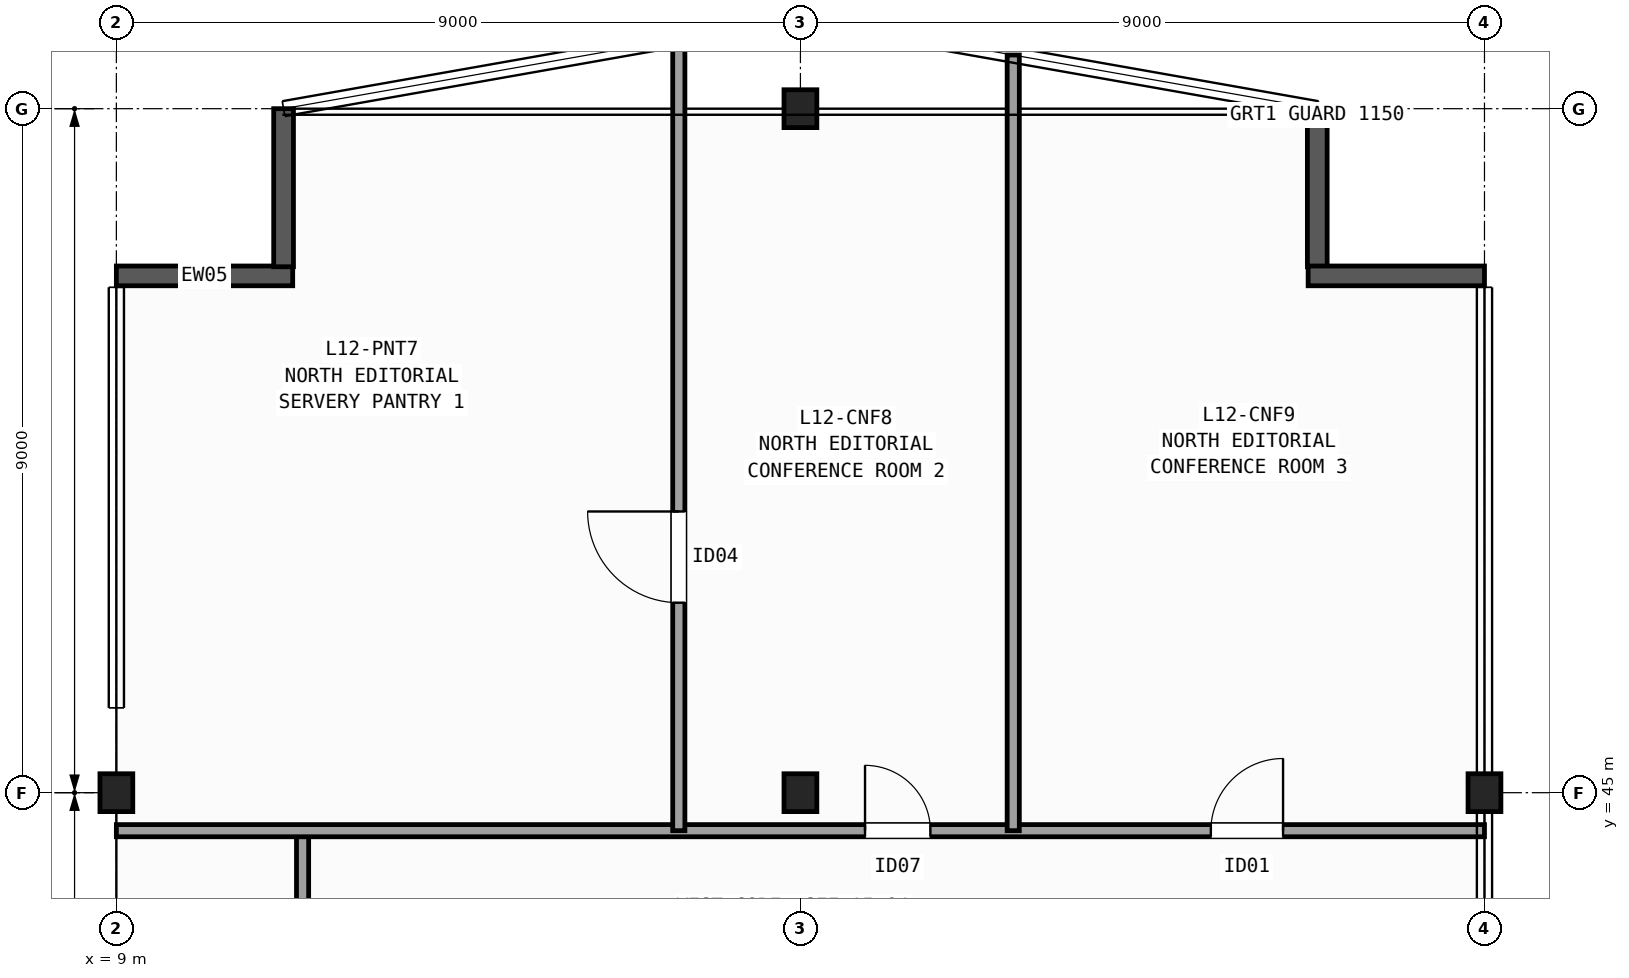
"""IFC4 building model, lengths in metres.
Left out: names, types, materials, properties, quantities, classifications, styles, units other than length and angle.
Written with IfcOpenShell. Run it as: python <this file> out.ifc"""

import sys

from ifc_helpers import new_model, si_unit, direction, frame, frame_2d, origin, origin_2d, place, context, subcontext, project, spatial, rectangle, i_section, extrude, element, fill, save


model = new_model("IFC4")
c1 = context("Model", 3, precision=1e-05, world=origin(), true_north=direction((0.0, 1.0)))
c2 = subcontext(c1, "Body", "Model", "MODEL_VIEW")
j1 = project(units=[si_unit("LENGTHUNIT", "METRE"), si_unit("PLANEANGLEUNIT", "RADIAN")], contexts=[c1])
p1 = place(None, origin())
s1 = spatial("IfcSite", under=j1, at=p1, CompositionType="ELEMENT")
p2 = place(p1, origin())
s2 = spatial("IfcBuilding", under=s1, at=p2, CompositionType="ELEMENT")
p3 = place(p2, frame((0.0, 0.0, 54.5)))
s3 = spatial("IfcBuildingStorey", under=s2, at=p3, CompositionType="ELEMENT", Elevation=54.5)
for number, where, z_axis, x_axis in (
    (1, (9.0, 45.0, 0.0), (0.0, 0.0, 1.0), (1.0, 0.0, 0.0)),
    (2, (18.0, 45.0, 0.0), (0.0, 0.0, 1.0), (1.0, 0.0, 0.0)),
    (3, (18.0, 54.0, 0.0), (0.0, 0.0, 1.0), (1.0, 0.0, 0.0)),
    (4, (27.0, 45.0, 0.0), (0.0, 0.0, 1.0), (1.0, 0.0, 0.0)),
):
    element("IfcColumn", number, at=place(p3, frame(where, z_axis=z_axis, x_axis=x_axis)), inside=s3, PredefinedType="COLUMN", context=c2, shape_type="SweptSolid", body=[
        extrude(i_section(OverallWidth=0.432, OverallDepth=0.498, WebThickness=0.056, FlangeThickness=0.089, FilletRadius=0.015, at=origin_2d()), origin(), (0.0, 0.0, 1.0), 3.7),
    ])
p4 = place(p3, frame((9.0, 51.8, 0.0), z_axis=(0.0, 0.0, 1.0), x_axis=(1.0, 0.0, 0.0)))
e5 = element("IfcWall", 5, at=p4, inside=s3, PredefinedType="SOLIDWALL", context=c2, shape_type="SweptSolid", body=[
    extrude(rectangle(XDim=2.32, YDim=0.26, at=frame_2d((1.16, 0.0))), origin(), (0.0, 0.0, 1.0), 3.42),
])
for number, where, z_axis, x_axis in (
    (6, (11.2, 51.92, 0.0), (0.0, 0.0, 1.0), (0.0, 1.0, 0.0)),
    (7, (24.8, 54.0, 0.0), (0.0, 0.0, 1.0), (0.0, -1.0, 0.0)),
):
    element("IfcWall", number, at=place(p3, frame(where, z_axis=z_axis, x_axis=x_axis)), inside=s3, PredefinedType="SOLIDWALL", context=c2, shape_type="SweptSolid", body=[
        extrude(rectangle(XDim=2.08, YDim=0.26, at=frame_2d((1.04, 0.0))), origin(), (0.0, 0.0, 1.0), 3.42),
    ])
p5 = place(p3, frame((24.68, 51.8, 0.0), z_axis=(0.0, 0.0, 1.0), x_axis=(1.0, 0.0, 0.0)))
e8 = element("IfcWall", 8, at=p5, inside=s3, PredefinedType="SOLIDWALL", context=c2, shape_type="SweptSolid", body=[
    extrude(rectangle(XDim=2.32, YDim=0.26, at=frame_2d((1.16, 0.0))), origin(), (0.0, 0.0, 1.0), 3.42),
])
p6 = place(p3, frame((11.45, 42.4, 0.0), z_axis=(0.0, 0.0, 1.0), x_axis=(0.0, 1.0, 0.0)))
e9 = element("IfcWall", 9, at=p6, inside=s3, PredefinedType="PARTITIONING", context=c2, shape_type="SweptSolid", body=[
    extrude(rectangle(XDim=2.1, YDim=0.16, at=frame_2d((1.05, 0.0))), origin(), (0.0, 0.0, 1.0), 3.42),
])
p7 = place(p3, frame((9.0, 44.5, 0.0), z_axis=(0.0, 0.0, 1.0), x_axis=(1.0, 0.0, 0.0)))
e10 = element("IfcWall", 10, at=p7, inside=s3, PredefinedType="PARTITIONING", context=c2, shape_type="SweptSolid", body=[
    extrude(rectangle(XDim=18.0, YDim=0.16, at=frame_2d((9.0, 0.0))), origin(), (0.0, 0.0, 1.0), 2.627),
])
p8 = place(p7, frame((9.85, 0.0, 0.0)))
e11 = element("IfcOpeningElement", 11, at=p8, cuts=e10, PredefinedType="OPENING", context=c2, shape_type="SweptSolid", body=[
    extrude(rectangle(XDim=0.86, YDim=2.05, at=frame_2d((0.43, 1.025))), frame((0.0, 0.09, 0.0), z_axis=(0.0, -1.0, 0.0), x_axis=(1.0, 0.0, 0.0)), (0.0, 0.0, 1.0), 0.18),
])
p9 = place(p7, frame((14.4, 0.0, 0.0)))
e12 = element("IfcOpeningElement", 12, at=p9, cuts=e10, PredefinedType="OPENING", context=c2, shape_type="SweptSolid", body=[
    extrude(rectangle(XDim=0.95, YDim=2.1, at=frame_2d((0.475, 1.05))), frame((0.0, 0.09, 0.0), z_axis=(0.0, -1.0, 0.0), x_axis=(1.0, 0.0, 0.0)), (0.0, 0.0, 1.0), 0.18),
])
p10 = place(p3, frame((16.4, 44.5, 0.0), z_axis=(0.0, 0.0, 1.0), x_axis=(0.0, 1.0, 0.0)))
e13 = element("IfcWall", 13, at=p10, inside=s3, PredefinedType="PARTITIONING", context=c2, shape_type="SweptSolid", body=[
    extrude(rectangle(XDim=10.418, YDim=0.16, at=frame_2d((5.209, 0.0))), origin(), (0.0, 0.0, 1.0), 3.42),
])
p11 = place(p10, frame((3.0, 0.0, 0.0)))
e14 = element("IfcOpeningElement", 14, at=p11, cuts=e13, PredefinedType="OPENING", context=c2, shape_type="SweptSolid", body=[
    extrude(rectangle(XDim=1.2, YDim=2.15, at=frame_2d((0.6, 1.075))), frame((0.0, 0.09, 0.0), z_axis=(0.0, -1.0, 0.0), x_axis=(1.0, 0.0, 0.0)), (0.0, 0.0, 1.0), 0.18),
])
p12 = place(p3, frame((20.8, 44.5, 0.0), z_axis=(0.0, 0.0, 1.0), x_axis=(0.0, 1.0, 0.0)))
e15 = element("IfcWall", 15, at=p12, inside=s3, PredefinedType="PARTITIONING", context=c2, shape_type="SweptSolid", body=[
    extrude(rectangle(XDim=10.206, YDim=0.16, at=frame_2d((5.103, 0.0))), origin(), (0.0, 0.0, 1.0), 3.42),
])
p13 = place(p11, origin())
e16 = element("IfcDoor", 16, at=p13, inside=s3, OperationType="SINGLE_SWING_RIGHT", PredefinedType="DOOR", context=c2, shape_type="SweptSolid", body=[
    extrude(rectangle(XDim=1.2, YDim=2.15, at=frame_2d((0.6, 1.075))), frame((0.0, 0.025, 0.0), z_axis=(0.0, -1.0, 0.0), x_axis=(1.0, 0.0, 0.0)), (0.0, 0.0, 1.0), 0.05),
])
fill(e14, e16)
p14 = place(p8, origin())
e17 = element("IfcDoor", 17, at=p14, inside=s3, OperationType="SINGLE_SWING_LEFT", PredefinedType="DOOR", context=c2, shape_type="SweptSolid", body=[
    extrude(rectangle(XDim=0.86, YDim=2.05, at=frame_2d((0.43, 1.025))), frame((0.0, 0.025, 0.0), z_axis=(0.0, -1.0, 0.0), x_axis=(1.0, 0.0, 0.0)), (0.0, 0.0, 1.0), 0.05),
])
fill(e11, e17)
p15 = place(p9, origin())
e18 = element("IfcDoor", 18, at=p15, inside=s3, OperationType="SINGLE_SWING_RIGHT", PredefinedType="DOOR", context=c2, shape_type="SweptSolid", body=[
    extrude(rectangle(XDim=0.95, YDim=2.1, at=frame_2d((0.475, 1.05))), frame((0.0, 0.025, 0.0), z_axis=(0.0, -1.0, 0.0), x_axis=(1.0, 0.0, 0.0)), (0.0, 0.0, 1.0), 0.05),
])
fill(e12, e18)
save(model, sys.argv[1])
